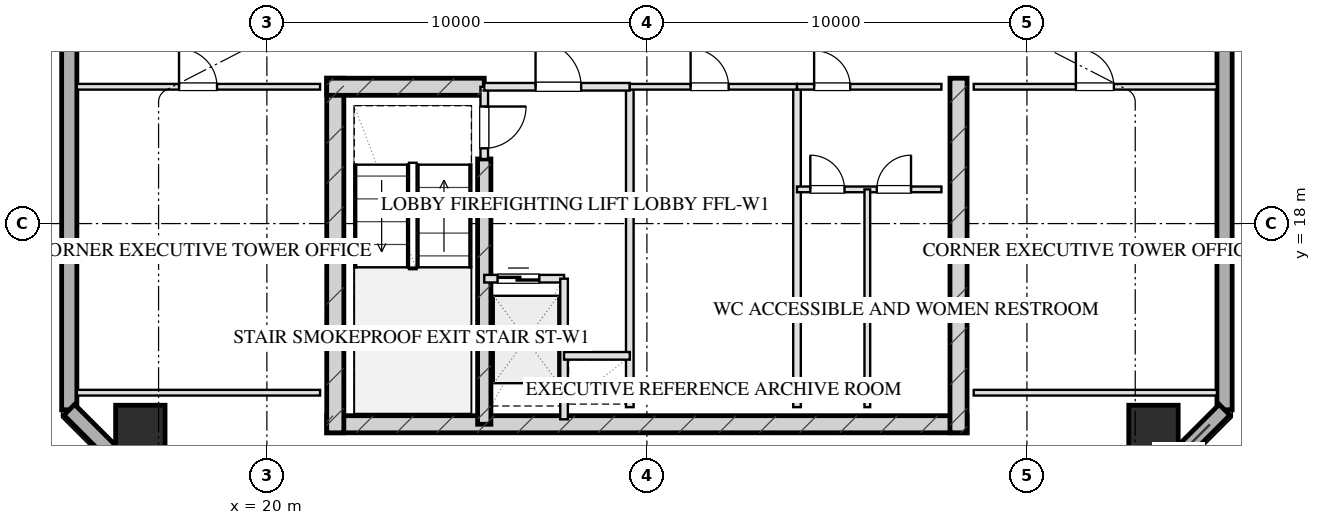
"""IFC4 building model, lengths in metres.
Left out: names, types, materials, properties, quantities, classifications, styles, units other than length and angle.
Written with IfcOpenShell. Run it as: python <this file> out.ifc"""

import sys

from ifc_helpers import new_model, si_unit, direction, frame, frame_2d, origin, origin_2d, place, context, subcontext, project, spatial, rectangle, hollow_rectangle, extrude, element, fill, save


model = new_model("IFC4")
c1 = context("Model", 3, precision=1e-05, world=origin(), true_north=direction((0.0, 1.0)))
c2 = subcontext(c1, "Body", "Model", "MODEL_VIEW")
j1 = project(units=[si_unit("LENGTHUNIT", "METRE"), si_unit("PLANEANGLEUNIT", "RADIAN")], contexts=[c1])
p1 = place(None, origin())
s1 = spatial("IfcSite", under=j1, at=p1, CompositionType="ELEMENT")
p2 = place(p1, origin())
s2 = spatial("IfcBuilding", under=s1, at=p2, CompositionType="ELEMENT")
p3 = place(p2, frame((0.0, 0.0, 223.1)))
s3 = spatial("IfcBuildingStorey", under=s2, at=p3, CompositionType="ELEMENT", Elevation=223.1)
p4 = place(p3, frame((21.575, 12.72, 0.0), z_axis=(0.0, 0.0, 1.0), x_axis=(1.0, 0.0, 0.0)))
e1 = element("IfcWall", 1, at=p4, inside=s3, PredefinedType="SHEAR", context=c2, shape_type="SweptSolid", body=[
    extrude(rectangle(XDim=16.85, YDim=0.45, at=frame_2d((8.425, 0.0))), origin(), (0.0, 0.0, 1.0), 3.45),
])
for number, where, z_axis, x_axis in (
    (2, (21.8, 21.825, 0.0), (0.0, 0.0, 1.0), (0.0, -1.0, 0.0)),
    (3, (38.2, 21.825, 0.0), (0.0, 0.0, 1.0), (0.0, -1.0, 0.0)),
):
    element("IfcWall", number, at=place(p3, frame(where, z_axis=z_axis, x_axis=x_axis)), inside=s3, PredefinedType="SHEAR", context=c2, shape_type="SweptSolid", body=[
        extrude(rectangle(XDim=9.33, YDim=0.45, at=frame_2d((4.665, 0.0))), origin(), (0.0, 0.0, 1.0), 3.45),
    ])
p5 = place(p3, frame((25.72, 19.7, 0.0), z_axis=(0.0, 0.0, 1.0), x_axis=(0.0, -1.0, 0.0)))
e4 = element("IfcWall", 4, at=p5, inside=s3, PredefinedType="SHEAR", context=c2, shape_type="SweptSolid", body=[
    extrude(rectangle(XDim=6.98, YDim=0.35, at=frame_2d((3.49, 0.0))), origin(), (0.0, 0.0, 1.0), 3.45),
])
p6 = place(p3, frame((21.575, 21.6, 0.0), z_axis=(0.0, 0.0, 1.0), x_axis=(1.0, 0.0, 0.0)))
e5 = element("IfcWall", 5, at=p6, inside=s3, PredefinedType="SHEAR", context=c2, shape_type="SweptSolid", body=[
    extrude(rectangle(XDim=4.145, YDim=0.45, at=frame_2d((2.073, 0.0))), origin(), (0.0, 0.0, 1.0), 3.45),
])
for number, where, z_axis, x_axis in (
    (6, (16.67, 12.57, 0.0), (0.0, 0.0, 1.0), (1.0, 0.0, 0.0)),
    (7, (43.33, 12.57, 0.0), (0.0, 0.0, 1.0), (1.0, 0.0, 0.0)),
):
    element("IfcColumn", number, at=place(p3, frame(where, z_axis=z_axis, x_axis=x_axis)), inside=s3, PredefinedType="COLUMN", context=c2, shape_type="SweptSolid", body=[
        extrude(hollow_rectangle(XDim=1.3, YDim=1.3, WallThickness=0.045, at=origin_2d()), origin(), (0.0, 0.0, 1.0), 3.451),
    ])
p7 = place(p3, frame((14.8, 13.1, 0.0), z_axis=(0.0, 0.0, 1.0), x_axis=(0.0, 1.0, 0.0)))
e8 = element("IfcWall", 8, at=p7, inside=s3, PredefinedType="SOLIDWALL", context=c2, shape_type="SweptSolid", body=[
    extrude(rectangle(XDim=41.8, YDim=0.4, at=frame_2d((20.9, 0.0))), origin(), (0.0, 0.0, 1.0), 2.61),
])
p8 = place(p7, frame((13.45, 0.0, 0.75)))
e9 = element("IfcOpeningElement", 9, at=p8, cuts=e8, PredefinedType="OPENING", context=c2, shape_type="SweptSolid", body=[
    extrude(rectangle(XDim=2.1, YDim=1.46, at=frame_2d((1.05, 0.73))), frame((0.0, 0.21, 0.0), z_axis=(0.0, -1.0, 0.0), x_axis=(1.0, 0.0, 0.0)), (0.0, 0.0, 1.0), 0.42),
])
p9 = place(p7, frame((17.25, 0.0, 0.75)))
e10 = element("IfcOpeningElement", 10, at=p9, cuts=e8, PredefinedType="OPENING", context=c2, shape_type="SweptSolid", body=[
    extrude(rectangle(XDim=2.1, YDim=1.46, at=frame_2d((1.05, 0.73))), frame((0.0, 0.21, 0.0), z_axis=(0.0, -1.0, 0.0), x_axis=(1.0, 0.0, 0.0)), (0.0, 0.0, 1.0), 0.42),
])
p10 = place(p7, frame((22.45, 0.0, 0.75)))
e11 = element("IfcOpeningElement", 11, at=p10, cuts=e8, PredefinedType="OPENING", context=c2, shape_type="SweptSolid", body=[
    extrude(rectangle(XDim=2.1, YDim=1.46, at=frame_2d((1.05, 0.73))), frame((0.0, 0.21, 0.0), z_axis=(0.0, -1.0, 0.0), x_axis=(1.0, 0.0, 0.0)), (0.0, 0.0, 1.0), 0.42),
])
p11 = place(p7, frame((26.25, 0.0, 0.75)))
e12 = element("IfcOpeningElement", 12, at=p11, cuts=e8, PredefinedType="OPENING", context=c2, shape_type="SweptSolid", body=[
    extrude(rectangle(XDim=2.1, YDim=1.46, at=frame_2d((1.05, 0.73))), frame((0.0, 0.21, 0.0), z_axis=(0.0, -1.0, 0.0), x_axis=(1.0, 0.0, 0.0)), (0.0, 0.0, 1.0), 0.42),
])
p12 = place(p3, frame((45.2, 54.9, 0.0), z_axis=(0.0, 0.0, 1.0), x_axis=(0.0, -1.0, 0.0)))
e13 = element("IfcWall", 13, at=p12, inside=s3, PredefinedType="SOLIDWALL", context=c2, shape_type="SweptSolid", body=[
    extrude(rectangle(XDim=41.8, YDim=0.4, at=frame_2d((20.9, 0.0))), origin(), (0.0, 0.0, 1.0), 2.61),
])
p13 = place(p12, frame((26.25, 0.0, 0.75)))
e14 = element("IfcOpeningElement", 14, at=p13, cuts=e13, PredefinedType="OPENING", context=c2, shape_type="SweptSolid", body=[
    extrude(rectangle(XDim=2.1, YDim=1.46, at=frame_2d((1.05, 0.73))), frame((0.0, 0.21, 0.0), z_axis=(0.0, -1.0, 0.0), x_axis=(1.0, 0.0, 0.0)), (0.0, 0.0, 1.0), 0.42),
])
p14 = place(p12, frame((22.45, 0.0, 0.75)))
e15 = element("IfcOpeningElement", 15, at=p14, cuts=e13, PredefinedType="OPENING", context=c2, shape_type="SweptSolid", body=[
    extrude(rectangle(XDim=2.1, YDim=1.46, at=frame_2d((1.05, 0.73))), frame((0.0, 0.21, 0.0), z_axis=(0.0, -1.0, 0.0), x_axis=(1.0, 0.0, 0.0)), (0.0, 0.0, 1.0), 0.42),
])
p15 = place(p12, frame((17.25, 0.0, 0.75)))
e16 = element("IfcOpeningElement", 16, at=p15, cuts=e13, PredefinedType="OPENING", context=c2, shape_type="SweptSolid", body=[
    extrude(rectangle(XDim=2.1, YDim=1.46, at=frame_2d((1.05, 0.73))), frame((0.0, 0.21, 0.0), z_axis=(0.0, -1.0, 0.0), x_axis=(1.0, 0.0, 0.0)), (0.0, 0.0, 1.0), 0.42),
])
p16 = place(p12, frame((13.45, 0.0, 0.75)))
e17 = element("IfcOpeningElement", 17, at=p16, cuts=e13, PredefinedType="OPENING", context=c2, shape_type="SweptSolid", body=[
    extrude(rectangle(XDim=2.1, YDim=1.46, at=frame_2d((1.05, 0.73))), frame((0.0, 0.21, 0.0), z_axis=(0.0, -1.0, 0.0), x_axis=(1.0, 0.0, 0.0)), (0.0, 0.0, 1.0), 0.42),
])
for number, where, z_axis, x_axis in (
    (18, (45.2, 13.1, 0.0), (0.0, 0.0, 1.0), (-0.707, -0.707, 0.0)),
    (19, (17.2, 10.7, 0.0), (0.0, 0.0, 1.0), (-0.707, 0.707, 0.0)),
):
    element("IfcWall", number, at=place(p3, frame(where, z_axis=z_axis, x_axis=x_axis)), inside=s3, PredefinedType="SOLIDWALL", context=c2, shape_type="SweptSolid", body=[
        extrude(rectangle(XDim=3.394, YDim=0.4, at=frame_2d((1.697, 0.0))), origin(), (0.0, 0.0, 1.0), 2.61),
    ])
p17 = place(p3, frame((25.72, 21.6, 0.0), z_axis=(0.0, 0.0, 1.0), x_axis=(0.0, -1.0, 0.0)))
e20 = element("IfcWall", 20, at=p17, inside=s3, PredefinedType="PARTITIONING", context=c2, shape_type="SweptSolid", body=[
    extrude(rectangle(XDim=1.9, YDim=0.2, at=frame_2d((0.95, 0.0))), origin(), (0.0, 0.0, 1.0), 3.175),
])
p18 = place(p17, frame((0.52, 0.0, 0.0)))
e21 = element("IfcOpeningElement", 21, at=p18, cuts=e20, PredefinedType="OPENING", context=c2, shape_type="SweptSolid", body=[
    extrude(rectangle(XDim=1.1, YDim=2.05, at=frame_2d((0.55, 1.025))), frame((0.0, 0.11, 0.0), z_axis=(0.0, -1.0, 0.0), x_axis=(1.0, 0.0, 0.0)), (0.0, 0.0, 1.0), 0.22),
])
p19 = place(p3, frame((29.55, 21.6, 0.0), z_axis=(0.0, 0.0, 1.0), x_axis=(0.0, -1.0, 0.0)))
e22 = element("IfcWall", 22, at=p19, inside=s3, PredefinedType="PARTITIONING", context=c2, shape_type="SweptSolid", body=[
    extrude(rectangle(XDim=8.43, YDim=0.2, at=frame_2d((4.215, 0.0))), origin(), (0.0, 0.0, 1.0), 3.175),
])
p20 = place(p3, frame((25.72, 21.6, 0.0), z_axis=(0.0, 0.0, 1.0), x_axis=(1.0, 0.0, 0.0)))
e23 = element("IfcWall", 23, at=p20, inside=s3, PredefinedType="PARTITIONING", context=c2, shape_type="SweptSolid", body=[
    extrude(rectangle(XDim=3.83, YDim=0.2, at=frame_2d((1.915, 0.0))), origin(), (0.0, 0.0, 1.0), 3.175),
])
p21 = place(p20, frame((1.35, 0.0, 0.0)))
e24 = element("IfcOpeningElement", 24, at=p21, cuts=e23, PredefinedType="OPENING", context=c2, shape_type="SweptSolid", body=[
    extrude(rectangle(XDim=1.2, YDim=2.05, at=frame_2d((0.6, 1.025))), frame((0.0, 0.11, 0.0), z_axis=(0.0, -1.0, 0.0), x_axis=(1.0, 0.0, 0.0)), (0.0, 0.0, 1.0), 0.22),
])
p22 = place(p3, frame((25.72, 16.55, 0.0), z_axis=(0.0, 0.0, 1.0), x_axis=(1.0, 0.0, 0.0)))
e25 = element("IfcWall", 25, at=p22, inside=s3, PredefinedType="PARTITIONING", context=c2, shape_type="SweptSolid", body=[
    extrude(rectangle(XDim=2.1, YDim=0.2, at=frame_2d((1.05, 0.0))), origin(), (0.0, 0.0, 1.0), 3.175),
])
p23 = place(p22, frame((0.35, 0.0, 0.0)))
e26 = element("IfcOpeningElement", 26, at=p23, cuts=e25, PredefinedType="OPENING", context=c2, shape_type="SweptSolid", body=[
    extrude(rectangle(XDim=1.1, YDim=2.05, at=frame_2d((0.55, 1.025))), frame((0.0, 0.11, 0.0), z_axis=(0.0, -1.0, 0.0), x_axis=(1.0, 0.0, 0.0)), (0.0, 0.0, 1.0), 0.22),
])
p24 = place(p3, frame((27.82, 16.55, 0.0), z_axis=(0.0, 0.0, 1.0), x_axis=(0.0, -1.0, 0.0)))
e27 = element("IfcWall", 27, at=p24, inside=s3, PredefinedType="PARTITIONING", context=c2, shape_type="SweptSolid", body=[
    extrude(rectangle(XDim=3.7, YDim=0.2, at=frame_2d((1.85, 0.0))), origin(), (0.0, 0.0, 1.0), 3.175),
])
p25 = place(p3, frame((27.82, 14.52, 0.0), z_axis=(0.0, 0.0, 1.0), x_axis=(1.0, 0.0, 0.0)))
e28 = element("IfcWall", 28, at=p25, inside=s3, PredefinedType="PARTITIONING", context=c2, shape_type="SweptSolid", body=[
    extrude(rectangle(XDim=1.73, YDim=0.2, at=frame_2d((0.865, 0.0))), origin(), (0.0, 0.0, 1.0), 3.175),
])
p26 = place(p3, frame((33.95, 21.6, 0.0), z_axis=(0.0, 0.0, 1.0), x_axis=(0.0, -1.0, 0.0)))
e29 = element("IfcWall", 29, at=p26, inside=s3, PredefinedType="PARTITIONING", context=c2, shape_type="SweptSolid", body=[
    extrude(rectangle(XDim=8.43, YDim=0.2, at=frame_2d((4.215, 0.0))), origin(), (0.0, 0.0, 1.0), 3.175),
])
p27 = place(p3, frame((29.55, 21.6, 0.0), z_axis=(0.0, 0.0, 1.0), x_axis=(1.0, 0.0, 0.0)))
e30 = element("IfcWall", 30, at=p27, inside=s3, PredefinedType="PARTITIONING", context=c2, shape_type="SweptSolid", body=[
    extrude(rectangle(XDim=4.4, YDim=0.15, at=frame_2d((2.2, 0.0))), origin(), (0.0, 0.0, 1.0), 3.175),
])
p28 = place(p27, frame((1.6, 0.0, 0.0)))
e31 = element("IfcOpeningElement", 31, at=p28, cuts=e30, PredefinedType="OPENING", context=c2, shape_type="SweptSolid", body=[
    extrude(rectangle(XDim=1.0, YDim=2.05, at=frame_2d((0.5, 1.025))), frame((0.0, 0.085, 0.0), z_axis=(0.0, -1.0, 0.0), x_axis=(1.0, 0.0, 0.0)), (0.0, 0.0, 1.0), 0.17),
])
p29 = place(p3, frame((33.95, 21.6, 0.0), z_axis=(0.0, 0.0, 1.0), x_axis=(1.0, 0.0, 0.0)))
e32 = element("IfcWall", 32, at=p29, inside=s3, PredefinedType="PARTITIONING", context=c2, shape_type="SweptSolid", body=[
    extrude(rectangle(XDim=3.8, YDim=0.15, at=frame_2d((1.9, 0.0))), origin(), (0.0, 0.0, 1.0), 3.175),
])
p30 = place(p29, frame((0.45, 0.0, 0.0)))
e33 = element("IfcOpeningElement", 33, at=p30, cuts=e32, PredefinedType="OPENING", context=c2, shape_type="SweptSolid", body=[
    extrude(rectangle(XDim=0.95, YDim=2.05, at=frame_2d((0.475, 1.025))), frame((0.0, 0.085, 0.0), z_axis=(0.0, -1.0, 0.0), x_axis=(1.0, 0.0, 0.0)), (0.0, 0.0, 1.0), 0.17),
])
p31 = place(p3, frame((33.95, 18.9, 0.0), z_axis=(0.0, 0.0, 1.0), x_axis=(1.0, 0.0, 0.0)))
e34 = element("IfcWall", 34, at=p31, inside=s3, PredefinedType="PARTITIONING", context=c2, shape_type="SweptSolid", body=[
    extrude(rectangle(XDim=3.8, YDim=0.15, at=frame_2d((1.9, 0.0))), origin(), (0.0, 0.0, 1.0), 3.175),
])
p32 = place(p31, frame((0.35, 0.0, 0.0)))
e35 = element("IfcOpeningElement", 35, at=p32, cuts=e34, PredefinedType="OPENING", context=c2, shape_type="SweptSolid", body=[
    extrude(rectangle(XDim=0.9, YDim=2.05, at=frame_2d((0.45, 1.025))), frame((0.0, 0.085, 0.0), z_axis=(0.0, -1.0, 0.0), x_axis=(1.0, 0.0, 0.0)), (0.0, 0.0, 1.0), 0.17),
])
p33 = place(p31, frame((2.1, 0.0, 0.0)))
e36 = element("IfcOpeningElement", 36, at=p33, cuts=e34, PredefinedType="OPENING", context=c2, shape_type="SweptSolid", body=[
    extrude(rectangle(XDim=0.9, YDim=2.05, at=frame_2d((0.45, 1.025))), frame((0.0, 0.085, 0.0), z_axis=(0.0, -1.0, 0.0), x_axis=(1.0, 0.0, 0.0)), (0.0, 0.0, 1.0), 0.17),
])
p34 = place(p3, frame((35.8, 18.9, 0.0), z_axis=(0.0, 0.0, 1.0), x_axis=(0.0, -1.0, 0.0)))
e37 = element("IfcWall", 37, at=p34, inside=s3, PredefinedType="PARTITIONING", context=c2, shape_type="SweptSolid", body=[
    extrude(rectangle(XDim=5.73, YDim=0.15, at=frame_2d((2.865, 0.0))), origin(), (0.0, 0.0, 1.0), 3.175),
])
p35 = place(p3, frame((15.0, 13.55, 0.0), z_axis=(0.0, 0.0, 1.0), x_axis=(1.0, 0.0, 0.0)))
e38 = element("IfcWall", 38, at=p35, inside=s3, PredefinedType="PARTITIONING", context=c2, shape_type="SweptSolid", body=[
    extrude(rectangle(XDim=6.4, YDim=0.15, at=frame_2d((3.2, 0.0))), origin(), (0.0, 0.0, 1.0), 3.175),
])
p36 = place(p3, frame((15.0, 21.6, 0.0), z_axis=(0.0, 0.0, 1.0), x_axis=(1.0, 0.0, 0.0)))
e39 = element("IfcWall", 39, at=p36, inside=s3, PredefinedType="PARTITIONING", context=c2, shape_type="SweptSolid", body=[
    extrude(rectangle(XDim=6.4, YDim=0.15, at=frame_2d((3.2, 0.0))), origin(), (0.0, 0.0, 1.0), 3.175),
])
p37 = place(p36, frame((2.688, 0.0, 0.0)))
e40 = element("IfcOpeningElement", 40, at=p37, cuts=e39, PredefinedType="OPENING", context=c2, shape_type="SweptSolid", body=[
    extrude(rectangle(XDim=1.0, YDim=2.05, at=frame_2d((0.5, 1.025))), frame((0.0, 0.085, 0.0), z_axis=(0.0, -1.0, 0.0), x_axis=(1.0, 0.0, 0.0)), (0.0, 0.0, 1.0), 0.17),
])
p38 = place(p3, frame((38.6, 13.55, 0.0), z_axis=(0.0, 0.0, 1.0), x_axis=(1.0, 0.0, 0.0)))
e41 = element("IfcWall", 41, at=p38, inside=s3, PredefinedType="PARTITIONING", context=c2, shape_type="SweptSolid", body=[
    extrude(rectangle(XDim=6.4, YDim=0.15, at=frame_2d((3.2, 0.0))), origin(), (0.0, 0.0, 1.0), 3.175),
])
p39 = place(p3, frame((38.6, 21.6, 0.0), z_axis=(0.0, 0.0, 1.0), x_axis=(1.0, 0.0, 0.0)))
e42 = element("IfcWall", 42, at=p39, inside=s3, PredefinedType="PARTITIONING", context=c2, shape_type="SweptSolid", body=[
    extrude(rectangle(XDim=6.4, YDim=0.15, at=frame_2d((3.2, 0.0))), origin(), (0.0, 0.0, 1.0), 3.175),
])
p40 = place(p39, frame((2.688, 0.0, 0.0)))
e43 = element("IfcOpeningElement", 43, at=p40, cuts=e42, PredefinedType="OPENING", context=c2, shape_type="SweptSolid", body=[
    extrude(rectangle(XDim=1.0, YDim=2.05, at=frame_2d((0.5, 1.025))), frame((0.0, 0.085, 0.0), z_axis=(0.0, -1.0, 0.0), x_axis=(1.0, 0.0, 0.0)), (0.0, 0.0, 1.0), 0.17),
])
p41 = place(p18, origin())
e44 = element("IfcDoor", 44, at=p41, inside=s3, OperationType="SINGLE_SWING_LEFT", PredefinedType="DOOR", context=c2, shape_type="SweptSolid", body=[
    extrude(rectangle(XDim=1.1, YDim=2.05, at=frame_2d((0.55, 1.025))), frame((0.0, 0.025, 0.0), z_axis=(0.0, -1.0, 0.0), x_axis=(1.0, 0.0, 0.0)), (0.0, 0.0, 1.0), 0.05),
])
fill(e21, e44)
p42 = place(p21, origin())
e45 = element("IfcDoor", 45, at=p42, inside=s3, OperationType="SINGLE_SWING_LEFT", PredefinedType="DOOR", context=c2, shape_type="SweptSolid", body=[
    extrude(rectangle(XDim=1.2, YDim=2.05, at=frame_2d((0.6, 1.025))), frame((0.0, 0.025, 0.0), z_axis=(0.0, -1.0, 0.0), x_axis=(1.0, 0.0, 0.0)), (0.0, 0.0, 1.0), 0.05),
])
fill(e24, e45)
p43 = place(p23, origin())
e46 = element("IfcDoor", 46, at=p43, inside=s3, OperationType="DOUBLE_DOOR_SLIDING", PredefinedType="DOOR", context=c2, shape_type="SweptSolid", body=[
    extrude(rectangle(XDim=1.1, YDim=2.05, at=frame_2d((0.55, 1.025))), frame((0.0, 0.025, 0.0), z_axis=(0.0, -1.0, 0.0), x_axis=(1.0, 0.0, 0.0)), (0.0, 0.0, 1.0), 0.05),
])
fill(e26, e46)
p44 = place(p28, origin())
e47 = element("IfcDoor", 47, at=p44, inside=s3, OperationType="SINGLE_SWING_LEFT", PredefinedType="DOOR", context=c2, shape_type="SweptSolid", body=[
    extrude(rectangle(XDim=1.0, YDim=2.05, at=frame_2d((0.5, 1.025))), frame((0.0, 0.025, 0.0), z_axis=(0.0, -1.0, 0.0), x_axis=(1.0, 0.0, 0.0)), (0.0, 0.0, 1.0), 0.05),
])
fill(e31, e47)
p45 = place(p30, origin())
e48 = element("IfcDoor", 48, at=p45, inside=s3, OperationType="SINGLE_SWING_LEFT", PredefinedType="DOOR", context=c2, shape_type="SweptSolid", body=[
    extrude(rectangle(XDim=0.95, YDim=2.05, at=frame_2d((0.475, 1.025))), frame((0.0, 0.025, 0.0), z_axis=(0.0, -1.0, 0.0), x_axis=(1.0, 0.0, 0.0)), (0.0, 0.0, 1.0), 0.05),
])
fill(e33, e48)
p46 = place(p32, origin())
e49 = element("IfcDoor", 49, at=p46, inside=s3, OperationType="SINGLE_SWING_LEFT", PredefinedType="DOOR", context=c2, shape_type="SweptSolid", body=[
    extrude(rectangle(XDim=0.9, YDim=2.05, at=frame_2d((0.45, 1.025))), frame((0.0, 0.025, 0.0), z_axis=(0.0, -1.0, 0.0), x_axis=(1.0, 0.0, 0.0)), (0.0, 0.0, 1.0), 0.05),
])
fill(e35, e49)
p47 = place(p33, origin())
e50 = element("IfcDoor", 50, at=p47, inside=s3, OperationType="SINGLE_SWING_RIGHT", PredefinedType="DOOR", context=c2, shape_type="SweptSolid", body=[
    extrude(rectangle(XDim=0.9, YDim=2.05, at=frame_2d((0.45, 1.025))), frame((0.0, 0.025, 0.0), z_axis=(0.0, -1.0, 0.0), x_axis=(1.0, 0.0, 0.0)), (0.0, 0.0, 1.0), 0.05),
])
fill(e36, e50)
p48 = place(p37, origin())
e51 = element("IfcDoor", 51, at=p48, inside=s3, OperationType="SINGLE_SWING_LEFT", PredefinedType="DOOR", context=c2, shape_type="SweptSolid", body=[
    extrude(rectangle(XDim=1.0, YDim=2.05, at=frame_2d((0.5, 1.025))), frame((0.0, 0.025, 0.0), z_axis=(0.0, -1.0, 0.0), x_axis=(1.0, 0.0, 0.0)), (0.0, 0.0, 1.0), 0.05),
])
fill(e40, e51)
p49 = place(p40, origin())
e52 = element("IfcDoor", 52, at=p49, inside=s3, OperationType="SINGLE_SWING_LEFT", PredefinedType="DOOR", context=c2, shape_type="SweptSolid", body=[
    extrude(rectangle(XDim=1.0, YDim=2.05, at=frame_2d((0.5, 1.025))), frame((0.0, 0.025, 0.0), z_axis=(0.0, -1.0, 0.0), x_axis=(1.0, 0.0, 0.0)), (0.0, 0.0, 1.0), 0.05),
])
fill(e43, e52)
save(model, sys.argv[1])
